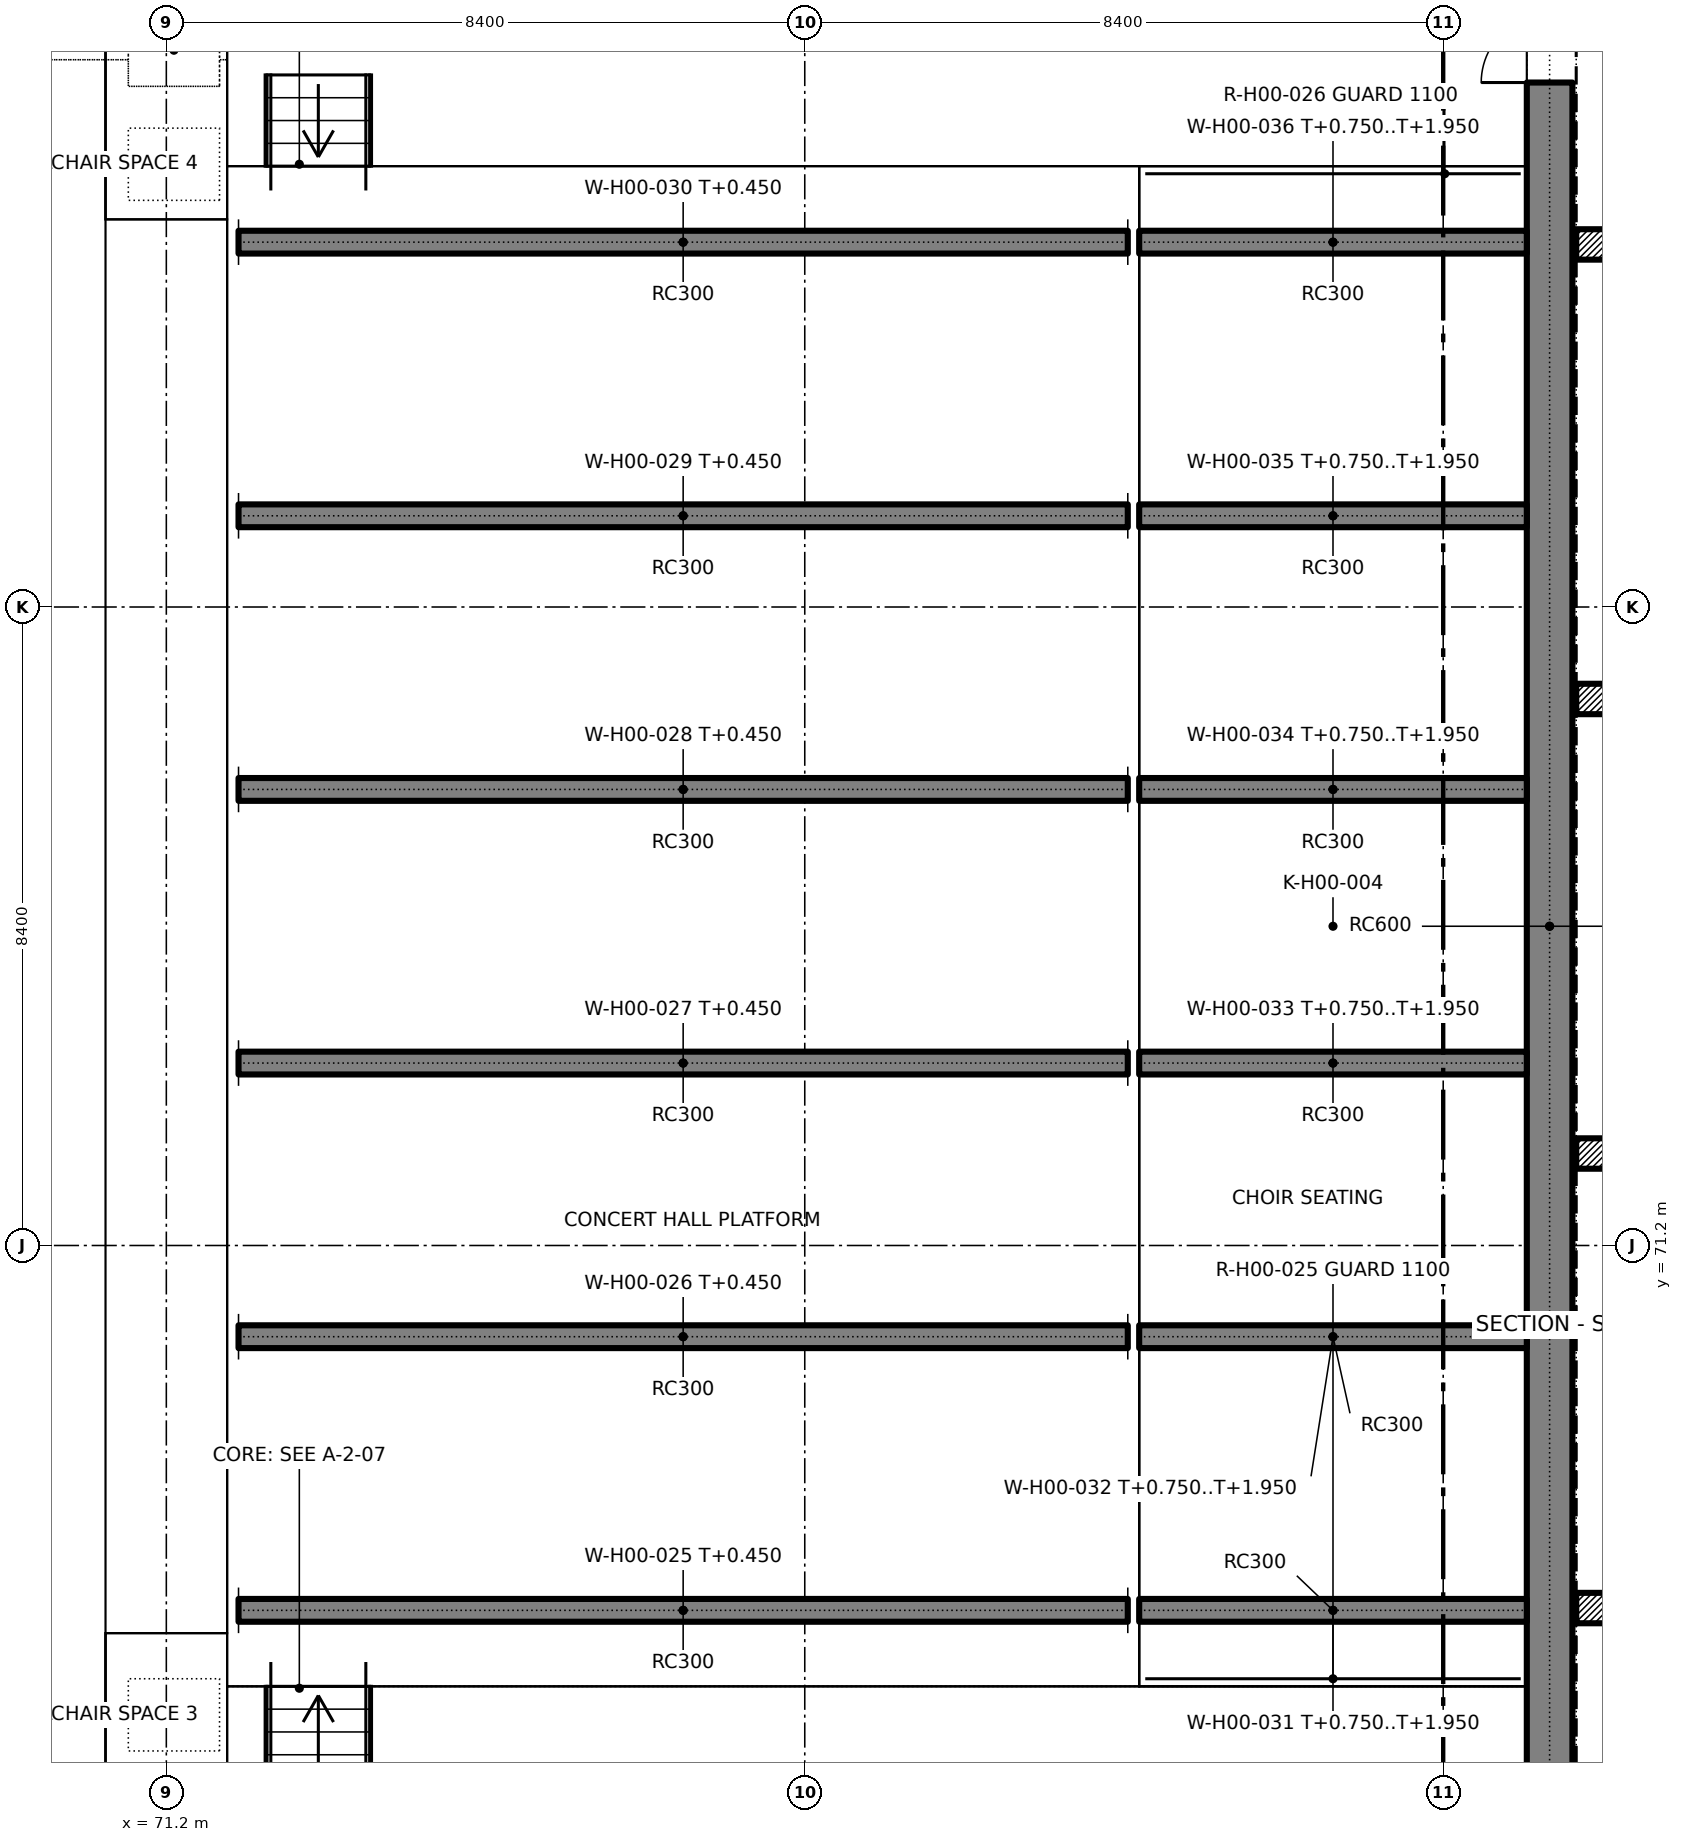
"""IFC4 building model, lengths in metres.
Left out: names, types, materials, properties, quantities, classifications, styles, units other than length and angle.
Written with IfcOpenShell. Run it as: python <this file> out.ifc"""

import sys

from ifc_helpers import new_model, si_unit, direction, frame, frame_2d, origin, origin_2d, place, context, subcontext, project, spatial, polyline, rectangle, outline, extrude, element, fill, save


model = new_model("IFC4")
c1 = context("Model", 3, precision=1e-05, world=origin(), true_north=direction((0.0, 1.0)))
c2 = subcontext(c1, "Body", "Model", "MODEL_VIEW")
j1 = project(units=[si_unit("LENGTHUNIT", "METRE"), si_unit("PLANEANGLEUNIT", "RADIAN")], contexts=[c1])
p1 = place(None, origin())
s1 = spatial("IfcSite", under=j1, at=p1, CompositionType="ELEMENT")
p2 = place(p1, origin())
s2 = spatial("IfcBuilding", under=s1, at=p2, CompositionType="ELEMENT")
p3 = place(p2, origin())
s3 = spatial("IfcBuildingStorey", under=s2, at=p3, CompositionType="ELEMENT", Elevation=0.0)
p4 = place(p3, frame((89.4, 60.7, 0.0), z_axis=(0.0, 0.0, 1.0), x_axis=(0.0, 1.0, 0.0)))
e1 = element("IfcWall", 1, at=p4, inside=s3, PredefinedType="SOLIDWALL", context=c2, shape_type="SweptSolid", body=[
    extrude(rectangle(XDim=29.4, YDim=0.6, at=frame_2d((14.7, 0.0))), origin(), (0.0, 0.0, 1.0), 5.4),
])
p5 = place(p4, frame((1.8, 0.0, 0.0)))
e2 = element("IfcOpeningElement", 2, at=p5, cuts=e1, PredefinedType="OPENING", context=c2, shape_type="SweptSolid", body=[
    extrude(rectangle(XDim=1.8, YDim=2.1, at=frame_2d((0.9, 1.05))), frame((0.0, 0.31, 0.0), z_axis=(0.0, -1.0, 0.0), x_axis=(1.0, 0.0, 0.0)), (0.0, 0.0, 1.0), 0.62),
])
p6 = place(p4, frame((25.8, 0.0, 0.0)))
e3 = element("IfcOpeningElement", 3, at=p6, cuts=e1, PredefinedType="OPENING", context=c2, shape_type="SweptSolid", body=[
    extrude(rectangle(XDim=1.8, YDim=2.1, at=frame_2d((0.9, 1.05))), frame((0.0, 0.31, 0.0), z_axis=(0.0, -1.0, 0.0), x_axis=(1.0, 0.0, 0.0)), (0.0, 0.0, 1.0), 0.62),
])
for number, where, z_axis, x_axis in (
    (4, (89.95, 66.43, 0.0), (0.0, 0.0, 1.0), (1.0, 0.0, 0.0)),
    (5, (89.95, 72.41, 0.0), (0.0, 0.0, 1.0), (1.0, 0.0, 0.0)),
    (6, (89.95, 78.39, 0.0), (0.0, 0.0, 1.0), (1.0, 0.0, 0.0)),
    (7, (89.95, 84.37, 0.0), (0.0, 0.0, 1.0), (1.0, 0.0, 0.0)),
):
    element("IfcColumn", number, at=place(p3, frame(where, z_axis=z_axis, x_axis=x_axis)), inside=s3, PredefinedType="COLUMN", context=c2, shape_type="SweptSolid", body=[
        extrude(rectangle(XDim=0.4, YDim=0.4, at=origin_2d()), origin(), (0.0, 0.0, 1.0), 5.4),
    ])
for number, where, z_axis, x_axis in (
    (8, (72.15, 66.4, 0.0), (0.0, 0.0, 1.0), (1.0, 0.0, 0.0)),
    (9, (72.15, 70.0, 0.0), (0.0, 0.0, 1.0), (1.0, 0.0, 0.0)),
    (10, (72.15, 73.6, 0.0), (0.0, 0.0, 1.0), (1.0, 0.0, 0.0)),
    (11, (72.15, 77.2, 0.0), (0.0, 0.0, 1.0), (1.0, 0.0, 0.0)),
    (12, (72.15, 80.8, 0.0), (0.0, 0.0, 1.0), (1.0, 0.0, 0.0)),
    (13, (72.15, 84.4, 0.0), (0.0, 0.0, 1.0), (1.0, 0.0, 0.0)),
):
    element("IfcWall", number, at=place(p3, frame(where, z_axis=z_axis, x_axis=x_axis)), inside=s3, PredefinedType="SOLIDWALL", context=c2, shape_type="SweptSolid", body=[
        extrude(rectangle(XDim=11.7, YDim=0.3, at=frame_2d((5.85, 0.0))), origin(), (0.0, 0.0, 1.0), 0.45),
    ])
for number, where, z_axis, x_axis in (
    (14, (84.0, 66.4, 0.0), (0.0, 0.0, 1.0), (1.0, 0.0, 0.0)),
    (15, (84.0, 70.0, 0.0), (0.0, 0.0, 1.0), (1.0, 0.0, 0.0)),
    (16, (84.0, 73.6, 0.0), (0.0, 0.0, 1.0), (1.0, 0.0, 0.0)),
    (17, (84.0, 77.2, 0.0), (0.0, 0.0, 1.0), (1.0, 0.0, 0.0)),
    (18, (84.0, 80.8, 0.0), (0.0, 0.0, 1.0), (1.0, 0.0, 0.0)),
    (19, (84.0, 84.4, 0.0), (0.0, 0.0, 1.0), (1.0, 0.0, 0.0)),
):
    element("IfcWall", number, at=place(p3, frame(where, z_axis=z_axis, x_axis=x_axis)), inside=s3, PredefinedType="SOLIDWALL", context=c2, shape_type="SweptSolid", body=[
        extrude(outline(polyline([(0.0, 0.0), (5.1, 0.0), (5.1, 1.95), (0.0, 0.75), (0.0, 0.0)])), frame((0.0, 0.15, 0.0), z_axis=(0.0, -1.0, 0.0), x_axis=(1.0, 0.0, 0.0)), (0.0, 0.0, 1.0), 0.3),
    ])
p7 = place(p3, frame((89.4, 65.01, -0.3), z_axis=(0.0, 0.0, 1.0), x_axis=(0.0, 1.0, 0.0)))
e20 = element("IfcWall", 20, at=p7, inside=s3, PredefinedType="SOLIDWALL", context=c2, shape_type="SweptSolid", body=[
    extrude(rectangle(XDim=2.84, YDim=0.6, at=frame_2d((1.42, 0.0))), origin(), (0.0, 0.0, 1.0), 0.3),
])
p8 = place(p3, frame((89.4, 70.89, -0.3), z_axis=(0.0, 0.0, 1.0), x_axis=(0.0, 1.0, 0.0)))
e21 = element("IfcWall", 21, at=p8, inside=s3, PredefinedType="SOLIDWALL", context=c2, shape_type="SweptSolid", body=[
    extrude(rectangle(XDim=3.04, YDim=0.6, at=frame_2d((1.52, 0.0))), origin(), (0.0, 0.0, 1.0), 0.3),
])
p9 = place(p3, frame((89.4, 76.87, -0.3), z_axis=(0.0, 0.0, 1.0), x_axis=(0.0, 1.0, 0.0)))
e22 = element("IfcWall", 22, at=p9, inside=s3, PredefinedType="SOLIDWALL", context=c2, shape_type="SweptSolid", body=[
    extrude(rectangle(XDim=3.04, YDim=0.6, at=frame_2d((1.52, 0.0))), origin(), (0.0, 0.0, 1.0), 0.3),
])
p10 = place(p3, frame((89.4, 82.95, -0.3), z_axis=(0.0, 0.0, 1.0), x_axis=(0.0, 1.0, 0.0)))
e23 = element("IfcWall", 23, at=p10, inside=s3, PredefinedType="SOLIDWALL", context=c2, shape_type="SweptSolid", body=[
    extrude(rectangle(XDim=2.84, YDim=0.6, at=frame_2d((1.42, 0.0))), origin(), (0.0, 0.0, 1.0), 0.3),
])
p11 = place(p3, frame((89.4, 73.93, -0.3), z_axis=(0.0, 0.0, 1.0), x_axis=(0.0, 1.0, 0.0)))
e24 = element("IfcWall", 24, at=p11, inside=s3, PredefinedType="SOLIDWALL", context=c2, shape_type="SweptSolid", body=[
    extrude(rectangle(XDim=2.94, YDim=0.6, at=frame_2d((1.47, 0.0))), origin(), (0.0, 0.0, 1.0), 0.3),
])
for number, where, z_axis, x_axis in (
    (25, (89.4, 61.97, -0.3), (0.0, 0.0, 1.0), (0.0, 1.0, 0.0)),
    (26, (89.4, 85.79, -0.3), (0.0, 0.0, 1.0), (0.0, 1.0, 0.0)),
):
    element("IfcWall", number, at=place(p3, frame(where, z_axis=z_axis, x_axis=x_axis)), inside=s3, PredefinedType="SOLIDWALL", context=c2, shape_type="SweptSolid", body=[
        extrude(rectangle(XDim=3.04, YDim=0.6, at=frame_2d((1.52, 0.0))), origin(), (0.0, 0.0, 1.0), 0.3),
    ])
p12 = place(p3, frame((89.4, 67.85, -0.3), z_axis=(0.0, 0.0, 1.0), x_axis=(0.0, 1.0, 0.0)))
e27 = element("IfcWall", 27, at=p12, inside=s3, PredefinedType="SOLIDWALL", context=c2, shape_type="SweptSolid", body=[
    extrude(rectangle(XDim=3.04, YDim=0.6, at=frame_2d((1.52, 0.0))), origin(), (0.0, 0.0, 1.0), 0.3),
])
p13 = place(p3, frame((89.4, 79.91, -0.3), z_axis=(0.0, 0.0, 1.0), x_axis=(0.0, 1.0, 0.0)))
e28 = element("IfcWall", 28, at=p13, inside=s3, PredefinedType="SOLIDWALL", context=c2, shape_type="SweptSolid", body=[
    extrude(rectangle(XDim=3.04, YDim=0.6, at=frame_2d((1.52, 0.0))), origin(), (0.0, 0.0, 1.0), 0.3),
])
p14 = place(p3, frame((72.15, 66.4, -0.805), z_axis=(0.0, 0.0, 1.0), x_axis=(1.0, 0.0, 0.0)))
e29 = element("IfcWall", 29, at=p14, inside=s3, PredefinedType="SOLIDWALL", context=c2, shape_type="SweptSolid", body=[
    extrude(rectangle(XDim=0.47, YDim=0.3, at=frame_2d((0.235, 0.0))), origin(), (0.0, 0.0, 1.0), 0.805),
])
p15 = place(p3, frame((72.62, 66.4, -0.3), z_axis=(0.0, 0.0, 1.0), x_axis=(1.0, 0.0, 0.0)))
e30 = element("IfcWall", 30, at=p15, inside=s3, PredefinedType="SOLIDWALL", context=c2, shape_type="SweptSolid", body=[
    extrude(rectangle(XDim=11.4, YDim=0.3, at=frame_2d((5.7, 0.0))), origin(), (0.0, 0.0, 1.0), 0.3),
])
p16 = place(p3, frame((72.15, 70.0, -0.805), z_axis=(0.0, 0.0, 1.0), x_axis=(1.0, 0.0, 0.0)))
e31 = element("IfcWall", 31, at=p16, inside=s3, PredefinedType="SOLIDWALL", context=c2, shape_type="SweptSolid", body=[
    extrude(rectangle(XDim=0.47, YDim=0.3, at=frame_2d((0.235, 0.0))), origin(), (0.0, 0.0, 1.0), 0.805),
])
p17 = place(p3, frame((72.62, 70.0, -0.3), z_axis=(0.0, 0.0, 1.0), x_axis=(1.0, 0.0, 0.0)))
e32 = element("IfcWall", 32, at=p17, inside=s3, PredefinedType="SOLIDWALL", context=c2, shape_type="SweptSolid", body=[
    extrude(rectangle(XDim=11.4, YDim=0.3, at=frame_2d((5.7, 0.0))), origin(), (0.0, 0.0, 1.0), 0.3),
])
p18 = place(p3, frame((72.0, 73.6, -0.805), z_axis=(0.0, 0.0, 1.0), x_axis=(1.0, 0.0, 0.0)))
e33 = element("IfcWall", 33, at=p18, inside=s3, PredefinedType="SOLIDWALL", context=c2, shape_type="SweptSolid", body=[
    extrude(rectangle(XDim=0.62, YDim=0.3, at=frame_2d((0.31, 0.0))), origin(), (0.0, 0.0, 1.0), 0.805),
])
p19 = place(p3, frame((72.62, 73.6, -0.3), z_axis=(0.0, 0.0, 1.0), x_axis=(1.0, 0.0, 0.0)))
e34 = element("IfcWall", 34, at=p19, inside=s3, PredefinedType="SOLIDWALL", context=c2, shape_type="SweptSolid", body=[
    extrude(rectangle(XDim=11.4, YDim=0.3, at=frame_2d((5.7, 0.0))), origin(), (0.0, 0.0, 1.0), 0.3),
])
p20 = place(p3, frame((72.0, 77.2, -0.805), z_axis=(0.0, 0.0, 1.0), x_axis=(1.0, 0.0, 0.0)))
e35 = element("IfcWall", 35, at=p20, inside=s3, PredefinedType="SOLIDWALL", context=c2, shape_type="SweptSolid", body=[
    extrude(rectangle(XDim=0.62, YDim=0.3, at=frame_2d((0.31, 0.0))), origin(), (0.0, 0.0, 1.0), 0.805),
])
p21 = place(p3, frame((72.62, 77.2, -0.3), z_axis=(0.0, 0.0, 1.0), x_axis=(1.0, 0.0, 0.0)))
e36 = element("IfcWall", 36, at=p21, inside=s3, PredefinedType="SOLIDWALL", context=c2, shape_type="SweptSolid", body=[
    extrude(rectangle(XDim=11.4, YDim=0.3, at=frame_2d((5.7, 0.0))), origin(), (0.0, 0.0, 1.0), 0.3),
])
p22 = place(p3, frame((72.15, 80.8, -0.805), z_axis=(0.0, 0.0, 1.0), x_axis=(1.0, 0.0, 0.0)))
e37 = element("IfcWall", 37, at=p22, inside=s3, PredefinedType="SOLIDWALL", context=c2, shape_type="SweptSolid", body=[
    extrude(rectangle(XDim=0.47, YDim=0.3, at=frame_2d((0.235, 0.0))), origin(), (0.0, 0.0, 1.0), 0.805),
])
p23 = place(p3, frame((72.62, 80.8, -0.3), z_axis=(0.0, 0.0, 1.0), x_axis=(1.0, 0.0, 0.0)))
e38 = element("IfcWall", 38, at=p23, inside=s3, PredefinedType="SOLIDWALL", context=c2, shape_type="SweptSolid", body=[
    extrude(rectangle(XDim=11.4, YDim=0.3, at=frame_2d((5.7, 0.0))), origin(), (0.0, 0.0, 1.0), 0.3),
])
p24 = place(p3, frame((72.15, 84.4, -0.805), z_axis=(0.0, 0.0, 1.0), x_axis=(1.0, 0.0, 0.0)))
e39 = element("IfcWall", 39, at=p24, inside=s3, PredefinedType="SOLIDWALL", context=c2, shape_type="SweptSolid", body=[
    extrude(rectangle(XDim=0.47, YDim=0.3, at=frame_2d((0.235, 0.0))), origin(), (0.0, 0.0, 1.0), 0.805),
])
p25 = place(p3, frame((72.62, 84.4, -0.3), z_axis=(0.0, 0.0, 1.0), x_axis=(1.0, 0.0, 0.0)))
e40 = element("IfcWall", 40, at=p25, inside=s3, PredefinedType="SOLIDWALL", context=c2, shape_type="SweptSolid", body=[
    extrude(rectangle(XDim=11.4, YDim=0.3, at=frame_2d((5.7, 0.0))), origin(), (0.0, 0.0, 1.0), 0.3),
])
p26 = place(p3, frame((88.43, 66.4, -0.3), z_axis=(0.0, 0.0, 1.0), x_axis=(1.0, 0.0, 0.0)))
e41 = element("IfcWall", 41, at=p26, inside=s3, PredefinedType="SOLIDWALL", context=c2, shape_type="SweptSolid", body=[
    extrude(rectangle(XDim=0.67, YDim=0.3, at=frame_2d((0.335, 0.0))), origin(), (0.0, 0.0, 1.0), 0.3),
])
p27 = place(p3, frame((84.02, 66.4, -0.3), z_axis=(0.0, 0.0, 1.0), x_axis=(1.0, 0.0, 0.0)))
e42 = element("IfcWall", 42, at=p27, inside=s3, PredefinedType="SOLIDWALL", context=c2, shape_type="SweptSolid", body=[
    extrude(rectangle(XDim=4.41, YDim=0.3, at=frame_2d((2.205, 0.0))), origin(), (0.0, 0.0, 1.0), 0.3),
])
p28 = place(p3, frame((84.02, 70.0, -0.3), z_axis=(0.0, 0.0, 1.0), x_axis=(1.0, 0.0, 0.0)))
e43 = element("IfcWall", 43, at=p28, inside=s3, PredefinedType="SOLIDWALL", context=c2, shape_type="SweptSolid", body=[
    extrude(rectangle(XDim=5.08, YDim=0.3, at=frame_2d((2.54, 0.0))), origin(), (0.0, 0.0, 1.0), 0.3),
])
p29 = place(p3, frame((88.43, 73.6, -0.3), z_axis=(0.0, 0.0, 1.0), x_axis=(1.0, 0.0, 0.0)))
e44 = element("IfcWall", 44, at=p29, inside=s3, PredefinedType="SOLIDWALL", context=c2, shape_type="SweptSolid", body=[
    extrude(rectangle(XDim=0.67, YDim=0.3, at=frame_2d((0.335, 0.0))), origin(), (0.0, 0.0, 1.0), 0.3),
])
p30 = place(p3, frame((84.02, 73.6, -0.3), z_axis=(0.0, 0.0, 1.0), x_axis=(1.0, 0.0, 0.0)))
e45 = element("IfcWall", 45, at=p30, inside=s3, PredefinedType="SOLIDWALL", context=c2, shape_type="SweptSolid", body=[
    extrude(rectangle(XDim=4.41, YDim=0.3, at=frame_2d((2.205, 0.0))), origin(), (0.0, 0.0, 1.0), 0.3),
])
p31 = place(p3, frame((88.43, 77.2, -0.3), z_axis=(0.0, 0.0, 1.0), x_axis=(1.0, 0.0, 0.0)))
e46 = element("IfcWall", 46, at=p31, inside=s3, PredefinedType="SOLIDWALL", context=c2, shape_type="SweptSolid", body=[
    extrude(rectangle(XDim=0.67, YDim=0.3, at=frame_2d((0.335, 0.0))), origin(), (0.0, 0.0, 1.0), 0.3),
])
p32 = place(p3, frame((84.02, 77.2, -0.3), z_axis=(0.0, 0.0, 1.0), x_axis=(1.0, 0.0, 0.0)))
e47 = element("IfcWall", 47, at=p32, inside=s3, PredefinedType="SOLIDWALL", context=c2, shape_type="SweptSolid", body=[
    extrude(rectangle(XDim=4.41, YDim=0.3, at=frame_2d((2.205, 0.0))), origin(), (0.0, 0.0, 1.0), 0.3),
])
p33 = place(p3, frame((84.02, 80.8, -0.3), z_axis=(0.0, 0.0, 1.0), x_axis=(1.0, 0.0, 0.0)))
e48 = element("IfcWall", 48, at=p33, inside=s3, PredefinedType="SOLIDWALL", context=c2, shape_type="SweptSolid", body=[
    extrude(rectangle(XDim=5.08, YDim=0.3, at=frame_2d((2.54, 0.0))), origin(), (0.0, 0.0, 1.0), 0.3),
])
p34 = place(p3, frame((88.43, 84.4, -0.3), z_axis=(0.0, 0.0, 1.0), x_axis=(1.0, 0.0, 0.0)))
e49 = element("IfcWall", 49, at=p34, inside=s3, PredefinedType="SOLIDWALL", context=c2, shape_type="SweptSolid", body=[
    extrude(rectangle(XDim=0.67, YDim=0.3, at=frame_2d((0.335, 0.0))), origin(), (0.0, 0.0, 1.0), 0.3),
])
p35 = place(p3, frame((84.02, 84.4, -0.3), z_axis=(0.0, 0.0, 1.0), x_axis=(1.0, 0.0, 0.0)))
e50 = element("IfcWall", 50, at=p35, inside=s3, PredefinedType="SOLIDWALL", context=c2, shape_type="SweptSolid", body=[
    extrude(rectangle(XDim=4.41, YDim=0.3, at=frame_2d((2.205, 0.0))), origin(), (0.0, 0.0, 1.0), 0.3),
])
p36 = place(p6, origin())
e51 = element("IfcDoor", 51, at=p36, inside=s3, OperationType="DOUBLE_DOOR_SINGLE_SWING", PredefinedType="DOOR", context=c2, shape_type="SweptSolid", body=[
    extrude(rectangle(XDim=1.8, YDim=2.1, at=frame_2d((0.9, 1.05))), frame((0.0, 0.025, 0.0), z_axis=(0.0, -1.0, 0.0), x_axis=(1.0, 0.0, 0.0)), (0.0, 0.0, 1.0), 0.05),
])
fill(e3, e51)
save(model, sys.argv[1])
